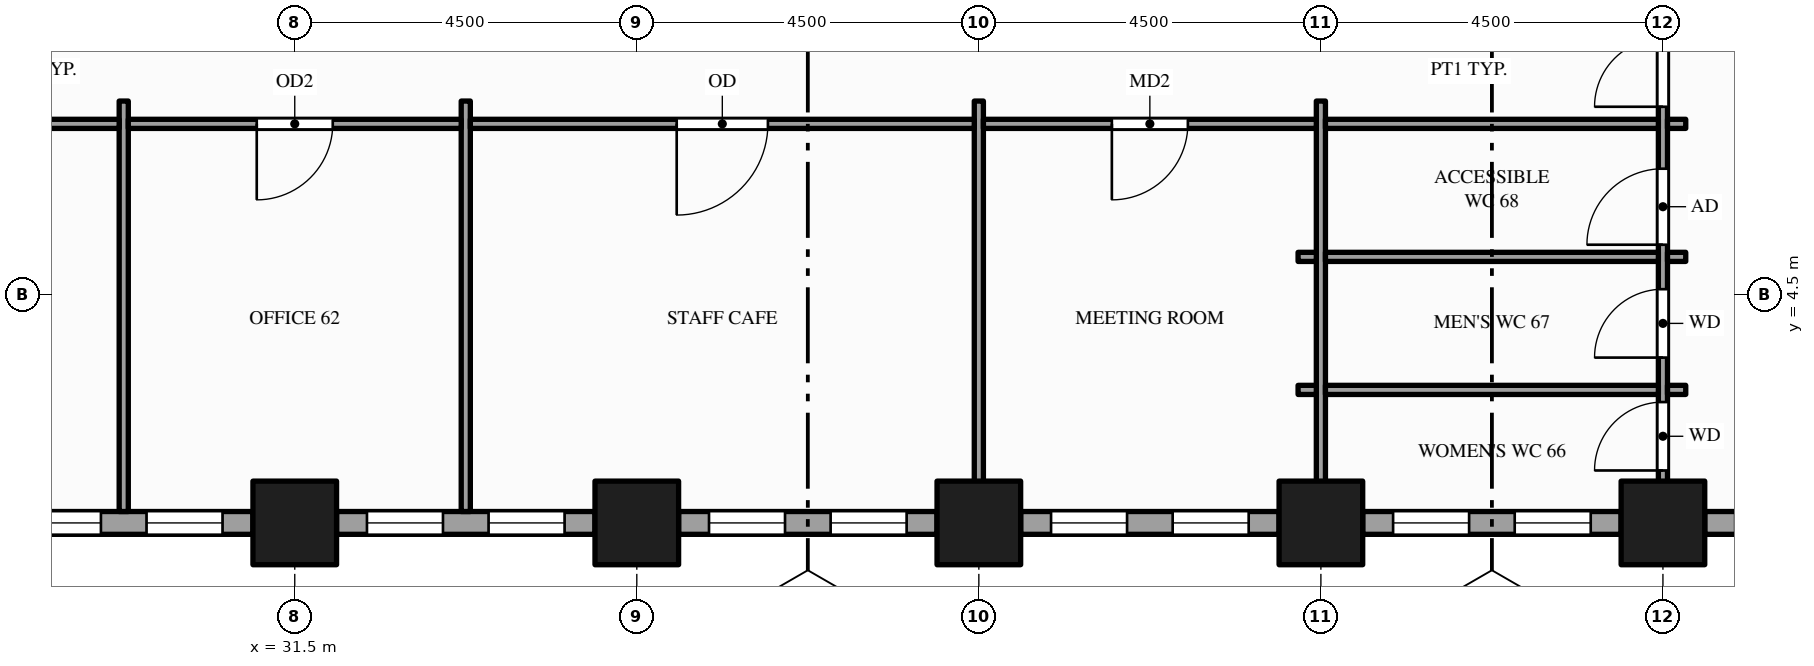
"""IFC4 building model, lengths in metres.
Left out: names, types, materials, properties, quantities, classifications, styles, units other than length and angle.
Written with IfcOpenShell. Run it as: python <this file> out.ifc"""

import sys

from ifc_helpers import new_model, si_unit, direction, frame, frame_2d, origin, origin_2d, place, context, subcontext, project, spatial, rectangle, hollow_rectangle, extrude, element, fill, save


model = new_model("IFC4")
c1 = context("Model", 3, precision=1e-05, world=origin(), true_north=direction((0.0, 1.0)))
c2 = subcontext(c1, "Body", "Model", "MODEL_VIEW")
j1 = project(units=[si_unit("LENGTHUNIT", "METRE"), si_unit("PLANEANGLEUNIT", "RADIAN")], contexts=[c1])
p1 = place(None, origin())
s1 = spatial("IfcSite", under=j1, at=p1, CompositionType="ELEMENT")
p2 = place(p1, origin())
s2 = spatial("IfcBuilding", under=s1, at=p2, CompositionType="ELEMENT")
p3 = place(p2, frame((0.0, 0.0, 49.0)))
s3 = spatial("IfcBuildingStorey", under=s2, at=p3, CompositionType="ELEMENT", Elevation=49.0)
for number, where, z_axis, x_axis in (
    (1, (31.5, 1.5, -0.15), (0.0, 0.0, 1.0), (1.0, 0.0, 0.0)),
    (2, (36.0, 1.5, -0.15), (0.0, 0.0, 1.0), (1.0, 0.0, 0.0)),
    (3, (40.5, 1.5, -0.15), (0.0, 0.0, 1.0), (1.0, 0.0, 0.0)),
    (4, (45.0, 1.5, -0.15), (0.0, 0.0, 1.0), (1.0, 0.0, 0.0)),
    (5, (49.5, 1.5, -0.15), (0.0, 0.0, 1.0), (1.0, 0.0, 0.0)),
):
    element("IfcColumn", number, at=place(p3, frame(where, z_axis=z_axis, x_axis=x_axis)), inside=s3, PredefinedType="COLUMN", context=c2, shape_type="SweptSolid", body=[
        extrude(hollow_rectangle(XDim=1.1, YDim=1.1, WallThickness=0.06, at=origin_2d()), origin(), (0.0, 0.0, 1.0), 4.0),
    ])
p4 = place(p3, frame((27.55, 1.5, 0.0), z_axis=(0.0, 0.0, 1.0), x_axis=(1.0, 0.0, 0.0)))
e6 = element("IfcWall", 6, at=p4, inside=s3, PredefinedType="STANDARD", context=c2, shape_type="SweptSolid", body=[
    extrude(rectangle(XDim=3.4, YDim=0.3, at=frame_2d((1.7, 0.0))), origin(), (0.0, 0.0, 1.0), 3.144),
])
p5 = place(p4, frame((0.4, 0.0, 0.9)))
e7 = element("IfcOpeningElement", 7, at=p5, cuts=e6, PredefinedType="OPENING", context=c2, shape_type="SweptSolid", body=[
    extrude(rectangle(XDim=1.0, YDim=2.0, at=frame_2d((0.5, 1.0))), frame((0.0, 0.16, 0.0), z_axis=(0.0, -1.0, 0.0), x_axis=(1.0, 0.0, 0.0)), (0.0, 0.0, 1.0), 0.32),
])
p6 = place(p4, frame((2.0, 0.0, 0.9)))
e8 = element("IfcOpeningElement", 8, at=p6, cuts=e6, PredefinedType="OPENING", context=c2, shape_type="SweptSolid", body=[
    extrude(rectangle(XDim=1.0, YDim=2.0, at=frame_2d((0.5, 1.0))), frame((0.0, 0.16, 0.0), z_axis=(0.0, -1.0, 0.0), x_axis=(1.0, 0.0, 0.0)), (0.0, 0.0, 1.0), 0.32),
])
p7 = place(p3, frame((32.05, 1.5, 0.0), z_axis=(0.0, 0.0, 1.0), x_axis=(1.0, 0.0, 0.0)))
e9 = element("IfcWall", 9, at=p7, inside=s3, PredefinedType="STANDARD", context=c2, shape_type="SweptSolid", body=[
    extrude(rectangle(XDim=3.4, YDim=0.3, at=frame_2d((1.7, 0.0))), origin(), (0.0, 0.0, 1.0), 3.144),
])
p8 = place(p7, frame((0.4, 0.0, 0.9)))
e10 = element("IfcOpeningElement", 10, at=p8, cuts=e9, PredefinedType="OPENING", context=c2, shape_type="SweptSolid", body=[
    extrude(rectangle(XDim=1.0, YDim=2.0, at=frame_2d((0.5, 1.0))), frame((0.0, 0.16, 0.0), z_axis=(0.0, -1.0, 0.0), x_axis=(1.0, 0.0, 0.0)), (0.0, 0.0, 1.0), 0.32),
])
p9 = place(p7, frame((2.0, 0.0, 0.9)))
e11 = element("IfcOpeningElement", 11, at=p9, cuts=e9, PredefinedType="OPENING", context=c2, shape_type="SweptSolid", body=[
    extrude(rectangle(XDim=1.0, YDim=2.0, at=frame_2d((0.5, 1.0))), frame((0.0, 0.16, 0.0), z_axis=(0.0, -1.0, 0.0), x_axis=(1.0, 0.0, 0.0)), (0.0, 0.0, 1.0), 0.32),
])
p10 = place(p3, frame((36.55, 1.5, 0.0), z_axis=(0.0, 0.0, 1.0), x_axis=(1.0, 0.0, 0.0)))
e12 = element("IfcWall", 12, at=p10, inside=s3, PredefinedType="STANDARD", context=c2, shape_type="SweptSolid", body=[
    extrude(rectangle(XDim=3.4, YDim=0.3, at=frame_2d((1.7, 0.0))), origin(), (0.0, 0.0, 1.0), 3.144),
])
p11 = place(p10, frame((0.4, 0.0, 0.9)))
e13 = element("IfcOpeningElement", 13, at=p11, cuts=e12, PredefinedType="OPENING", context=c2, shape_type="SweptSolid", body=[
    extrude(rectangle(XDim=1.0, YDim=2.0, at=frame_2d((0.5, 1.0))), frame((0.0, 0.16, 0.0), z_axis=(0.0, -1.0, 0.0), x_axis=(1.0, 0.0, 0.0)), (0.0, 0.0, 1.0), 0.32),
])
p12 = place(p10, frame((2.0, 0.0, 0.9)))
e14 = element("IfcOpeningElement", 14, at=p12, cuts=e12, PredefinedType="OPENING", context=c2, shape_type="SweptSolid", body=[
    extrude(rectangle(XDim=1.0, YDim=2.0, at=frame_2d((0.5, 1.0))), frame((0.0, 0.16, 0.0), z_axis=(0.0, -1.0, 0.0), x_axis=(1.0, 0.0, 0.0)), (0.0, 0.0, 1.0), 0.32),
])
p13 = place(p3, frame((41.05, 1.5, 0.0), z_axis=(0.0, 0.0, 1.0), x_axis=(1.0, 0.0, 0.0)))
e15 = element("IfcWall", 15, at=p13, inside=s3, PredefinedType="STANDARD", context=c2, shape_type="SweptSolid", body=[
    extrude(rectangle(XDim=3.4, YDim=0.3, at=frame_2d((1.7, 0.0))), origin(), (0.0, 0.0, 1.0), 3.144),
])
p14 = place(p13, frame((0.4, 0.0, 0.9)))
e16 = element("IfcOpeningElement", 16, at=p14, cuts=e15, PredefinedType="OPENING", context=c2, shape_type="SweptSolid", body=[
    extrude(rectangle(XDim=1.0, YDim=2.0, at=frame_2d((0.5, 1.0))), frame((0.0, 0.16, 0.0), z_axis=(0.0, -1.0, 0.0), x_axis=(1.0, 0.0, 0.0)), (0.0, 0.0, 1.0), 0.32),
])
p15 = place(p13, frame((2.0, 0.0, 0.9)))
e17 = element("IfcOpeningElement", 17, at=p15, cuts=e15, PredefinedType="OPENING", context=c2, shape_type="SweptSolid", body=[
    extrude(rectangle(XDim=1.0, YDim=2.0, at=frame_2d((0.5, 1.0))), frame((0.0, 0.16, 0.0), z_axis=(0.0, -1.0, 0.0), x_axis=(1.0, 0.0, 0.0)), (0.0, 0.0, 1.0), 0.32),
])
p16 = place(p3, frame((45.55, 1.5, 0.0), z_axis=(0.0, 0.0, 1.0), x_axis=(1.0, 0.0, 0.0)))
e18 = element("IfcWall", 18, at=p16, inside=s3, PredefinedType="STANDARD", context=c2, shape_type="SweptSolid", body=[
    extrude(rectangle(XDim=3.4, YDim=0.3, at=frame_2d((1.7, 0.0))), origin(), (0.0, 0.0, 1.0), 3.144),
])
p17 = place(p16, frame((0.4, 0.0, 0.9)))
e19 = element("IfcOpeningElement", 19, at=p17, cuts=e18, PredefinedType="OPENING", context=c2, shape_type="SweptSolid", body=[
    extrude(rectangle(XDim=1.0, YDim=2.0, at=frame_2d((0.5, 1.0))), frame((0.0, 0.16, 0.0), z_axis=(0.0, -1.0, 0.0), x_axis=(1.0, 0.0, 0.0)), (0.0, 0.0, 1.0), 0.32),
])
p18 = place(p16, frame((2.0, 0.0, 0.9)))
e20 = element("IfcOpeningElement", 20, at=p18, cuts=e18, PredefinedType="OPENING", context=c2, shape_type="SweptSolid", body=[
    extrude(rectangle(XDim=1.0, YDim=2.0, at=frame_2d((0.5, 1.0))), frame((0.0, 0.16, 0.0), z_axis=(0.0, -1.0, 0.0), x_axis=(1.0, 0.0, 0.0)), (0.0, 0.0, 1.0), 0.32),
])
p19 = place(p3, frame((50.05, 1.5, 0.0), z_axis=(0.0, 0.0, 1.0), x_axis=(1.0, 0.0, 0.0)))
e21 = element("IfcWall", 21, at=p19, inside=s3, PredefinedType="STANDARD", context=c2, shape_type="SweptSolid", body=[
    extrude(rectangle(XDim=3.95, YDim=0.3, at=frame_2d((1.975, 0.0))), origin(), (0.0, 0.0, 1.0), 3.144),
])
p20 = place(p19, frame((0.4, 0.0, 0.9)))
e22 = element("IfcOpeningElement", 22, at=p20, cuts=e21, PredefinedType="OPENING", context=c2, shape_type="SweptSolid", body=[
    extrude(rectangle(XDim=1.0, YDim=2.0, at=frame_2d((0.5, 1.0))), frame((0.0, 0.16, 0.0), z_axis=(0.0, -1.0, 0.0), x_axis=(1.0, 0.0, 0.0)), (0.0, 0.0, 1.0), 0.32),
])
p21 = place(p19, frame((2.0, 0.0, 0.9)))
e23 = element("IfcOpeningElement", 23, at=p21, cuts=e21, PredefinedType="OPENING", context=c2, shape_type="SweptSolid", body=[
    extrude(rectangle(XDim=1.55, YDim=2.0, at=frame_2d((0.775, 1.0))), frame((0.0, 0.16, 0.0), z_axis=(0.0, -1.0, 0.0), x_axis=(1.0, 0.0, 0.0)), (0.0, 0.0, 1.0), 0.32),
])
for number, where, z_axis, x_axis in (
    (24, (29.25, 1.65, 0.0), (0.0, 0.0, 1.0), (0.0, 1.0, 0.0)),
    (25, (33.75, 1.65, 0.0), (0.0, 0.0, 1.0), (0.0, 1.0, 0.0)),
    (26, (40.5, 1.65, 0.0), (0.0, 0.0, 1.0), (0.0, 1.0, 0.0)),
    (27, (45.0, 1.65, 0.0), (0.0, 0.0, 1.0), (0.0, 1.0, 0.0)),
):
    element("IfcWall", number, at=place(p3, frame(where, z_axis=z_axis, x_axis=x_axis)), inside=s3, PredefinedType="PARTITIONING", context=c2, shape_type="SweptSolid", body=[
        extrude(rectangle(XDim=5.4, YDim=0.12, at=frame_2d((2.7, 0.0))), origin(), (0.0, 0.0, 1.0), 2.938),
    ])
p22 = place(p3, frame((49.5, 1.65, 0.0), z_axis=(0.0, 0.0, 1.0), x_axis=(0.0, 1.0, 0.0)))
e28 = element("IfcWall", 28, at=p22, inside=s3, PredefinedType="PARTITIONING", context=c2, shape_type="SweptSolid", body=[
    extrude(rectangle(XDim=22.2, YDim=0.12, at=frame_2d((11.1, 0.0))), origin(), (0.0, 0.0, 1.0), 2.938),
])
p23 = place(p22, frame((5.325, 0.0, 0.0)))
e29 = element("IfcOpeningElement", 29, at=p23, cuts=e28, PredefinedType="OPENING", context=c2, shape_type="SweptSolid", body=[
    extrude(rectangle(XDim=1.8, YDim=2.1, at=frame_2d((0.9, 1.05))), frame((0.0, 0.07, 0.0), z_axis=(0.0, -1.0, 0.0), x_axis=(1.0, 0.0, 0.0)), (0.0, 0.0, 1.0), 0.14),
])
p24 = place(p22, frame((0.54, 0.0, 0.0)))
e30 = element("IfcOpeningElement", 30, at=p24, cuts=e28, PredefinedType="OPENING", context=c2, shape_type="SweptSolid", body=[
    extrude(rectangle(XDim=0.9, YDim=2.1, at=frame_2d((0.45, 1.05))), frame((0.0, 0.07, 0.0), z_axis=(0.0, -1.0, 0.0), x_axis=(1.0, 0.0, 0.0)), (0.0, 0.0, 1.0), 0.14),
])
p25 = place(p22, frame((2.025, 0.0, 0.0)))
e31 = element("IfcOpeningElement", 31, at=p25, cuts=e28, PredefinedType="OPENING", context=c2, shape_type="SweptSolid", body=[
    extrude(rectangle(XDim=0.9, YDim=2.1, at=frame_2d((0.45, 1.05))), frame((0.0, 0.07, 0.0), z_axis=(0.0, -1.0, 0.0), x_axis=(1.0, 0.0, 0.0)), (0.0, 0.0, 1.0), 0.14),
])
p26 = place(p22, frame((3.51, 0.0, 0.0)))
e32 = element("IfcOpeningElement", 32, at=p26, cuts=e28, PredefinedType="OPENING", context=c2, shape_type="SweptSolid", body=[
    extrude(rectangle(XDim=1.0, YDim=2.1, at=frame_2d((0.5, 1.05))), frame((0.0, 0.07, 0.0), z_axis=(0.0, -1.0, 0.0), x_axis=(1.0, 0.0, 0.0)), (0.0, 0.0, 1.0), 0.14),
])
p27 = place(p3, frame((44.7, 3.25, 0.0), z_axis=(0.0, 0.0, 1.0), x_axis=(1.0, 0.0, 0.0)))
e33 = element("IfcWall", 33, at=p27, inside=s3, PredefinedType="PARTITIONING", context=c2, shape_type="SweptSolid", body=[
    extrude(rectangle(XDim=0.24, YDim=0.12, at=frame_2d((0.12, 0.0))), origin(), (0.0, 0.0, 1.0), 2.938),
])
p28 = place(p3, frame((45.06, 3.25, 0.0), z_axis=(0.0, 0.0, 1.0), x_axis=(1.0, 0.0, 0.0)))
e34 = element("IfcWall", 34, at=p28, inside=s3, PredefinedType="PARTITIONING", context=c2, shape_type="SweptSolid", body=[
    extrude(rectangle(XDim=4.38, YDim=0.12, at=frame_2d((2.19, 0.0))), origin(), (0.0, 0.0, 1.0), 2.938),
])
for number, where, z_axis, x_axis in (
    (35, (49.56, 3.25, 0.0), (0.0, 0.0, 1.0), (1.0, 0.0, 0.0)),
    (36, (44.7, 5.0, 0.0), (0.0, 0.0, 1.0), (1.0, 0.0, 0.0)),
):
    element("IfcWall", number, at=place(p3, frame(where, z_axis=z_axis, x_axis=x_axis)), inside=s3, PredefinedType="PARTITIONING", context=c2, shape_type="SweptSolid", body=[
        extrude(rectangle(XDim=0.24, YDim=0.12, at=frame_2d((0.12, 0.0))), origin(), (0.0, 0.0, 1.0), 2.938),
    ])
p29 = place(p3, frame((45.06, 5.0, 0.0), z_axis=(0.0, 0.0, 1.0), x_axis=(1.0, 0.0, 0.0)))
e37 = element("IfcWall", 37, at=p29, inside=s3, PredefinedType="PARTITIONING", context=c2, shape_type="SweptSolid", body=[
    extrude(rectangle(XDim=4.38, YDim=0.12, at=frame_2d((2.19, 0.0))), origin(), (0.0, 0.0, 1.0), 2.938),
])
p30 = place(p3, frame((49.56, 5.0, 0.0), z_axis=(0.0, 0.0, 1.0), x_axis=(1.0, 0.0, 0.0)))
e38 = element("IfcWall", 38, at=p30, inside=s3, PredefinedType="PARTITIONING", context=c2, shape_type="SweptSolid", body=[
    extrude(rectangle(XDim=0.24, YDim=0.12, at=frame_2d((0.12, 0.0))), origin(), (0.0, 0.0, 1.0), 2.938),
])
p31 = place(p3, frame((22.56, 6.75, 0.0), z_axis=(0.0, 0.0, 1.0), x_axis=(1.0, 0.0, 0.0)))
e39 = element("IfcWall", 39, at=p31, inside=s3, PredefinedType="PARTITIONING", context=c2, shape_type="SweptSolid", body=[
    extrude(rectangle(XDim=6.63, YDim=0.12, at=frame_2d((3.315, 0.0))), origin(), (0.0, 0.0, 1.0), 2.938),
])
p32 = place(p31, frame((2.865, 0.0, 0.0)))
e40 = element("IfcOpeningElement", 40, at=p32, cuts=e39, PredefinedType="OPENING", context=c2, shape_type="SweptSolid", body=[
    extrude(rectangle(XDim=0.9, YDim=2.1, at=frame_2d((0.45, 1.05))), frame((0.0, 0.07, 0.0), z_axis=(0.0, -1.0, 0.0), x_axis=(1.0, 0.0, 0.0)), (0.0, 0.0, 1.0), 0.14),
])
p33 = place(p3, frame((29.31, 6.75, 0.0), z_axis=(0.0, 0.0, 1.0), x_axis=(1.0, 0.0, 0.0)))
e41 = element("IfcWall", 41, at=p33, inside=s3, PredefinedType="PARTITIONING", context=c2, shape_type="SweptSolid", body=[
    extrude(rectangle(XDim=4.38, YDim=0.12, at=frame_2d((2.19, 0.0))), origin(), (0.0, 0.0, 1.0), 2.938),
])
p34 = place(p33, frame((1.69, 0.0, 0.0)))
e42 = element("IfcOpeningElement", 42, at=p34, cuts=e41, PredefinedType="OPENING", context=c2, shape_type="SweptSolid", body=[
    extrude(rectangle(XDim=1.0, YDim=2.1, at=frame_2d((0.5, 1.05))), frame((0.0, 0.07, 0.0), z_axis=(0.0, -1.0, 0.0), x_axis=(1.0, 0.0, 0.0)), (0.0, 0.0, 1.0), 0.14),
])
p35 = place(p3, frame((33.81, 6.75, 0.0), z_axis=(0.0, 0.0, 1.0), x_axis=(1.0, 0.0, 0.0)))
e43 = element("IfcWall", 43, at=p35, inside=s3, PredefinedType="PARTITIONING", context=c2, shape_type="SweptSolid", body=[
    extrude(rectangle(XDim=6.63, YDim=0.12, at=frame_2d((3.315, 0.0))), origin(), (0.0, 0.0, 1.0), 2.938),
])
p36 = place(p35, frame((2.715, 0.0, 0.0)))
e44 = element("IfcOpeningElement", 44, at=p36, cuts=e43, PredefinedType="OPENING", context=c2, shape_type="SweptSolid", body=[
    extrude(rectangle(XDim=1.2, YDim=2.1, at=frame_2d((0.6, 1.05))), frame((0.0, 0.07, 0.0), z_axis=(0.0, -1.0, 0.0), x_axis=(1.0, 0.0, 0.0)), (0.0, 0.0, 1.0), 0.14),
])
p37 = place(p3, frame((40.56, 6.75, 0.0), z_axis=(0.0, 0.0, 1.0), x_axis=(1.0, 0.0, 0.0)))
e45 = element("IfcWall", 45, at=p37, inside=s3, PredefinedType="PARTITIONING", context=c2, shape_type="SweptSolid", body=[
    extrude(rectangle(XDim=4.38, YDim=0.12, at=frame_2d((2.19, 0.0))), origin(), (0.0, 0.0, 1.0), 2.938),
])
p38 = place(p37, frame((1.69, 0.0, 0.0)))
e46 = element("IfcOpeningElement", 46, at=p38, cuts=e45, PredefinedType="OPENING", context=c2, shape_type="SweptSolid", body=[
    extrude(rectangle(XDim=1.0, YDim=2.1, at=frame_2d((0.5, 1.05))), frame((0.0, 0.07, 0.0), z_axis=(0.0, -1.0, 0.0), x_axis=(1.0, 0.0, 0.0)), (0.0, 0.0, 1.0), 0.14),
])
p39 = place(p3, frame((45.06, 6.75, 0.0), z_axis=(0.0, 0.0, 1.0), x_axis=(1.0, 0.0, 0.0)))
e47 = element("IfcWall", 47, at=p39, inside=s3, PredefinedType="PARTITIONING", context=c2, shape_type="SweptSolid", body=[
    extrude(rectangle(XDim=4.38, YDim=0.12, at=frame_2d((2.19, 0.0))), origin(), (0.0, 0.0, 1.0), 2.938),
])
p40 = place(p3, frame((49.56, 6.75, 0.0), z_axis=(0.0, 0.0, 1.0), x_axis=(1.0, 0.0, 0.0)))
e48 = element("IfcWall", 48, at=p40, inside=s3, PredefinedType="PARTITIONING", context=c2, shape_type="SweptSolid", body=[
    extrude(rectangle(XDim=0.24, YDim=0.12, at=frame_2d((0.12, 0.0))), origin(), (0.0, 0.0, 1.0), 2.938),
])
p41 = place(p5, origin())
e49 = element("IfcWindow", 49, at=p41, inside=s3, PartitioningType="SINGLE_PANEL", PredefinedType="WINDOW", context=c2, shape_type="SweptSolid", body=[
    extrude(rectangle(XDim=1.0, YDim=2.0, at=frame_2d((0.5, 1.0))), frame((0.0, 0.03, 0.0), z_axis=(0.0, -1.0, 0.0), x_axis=(1.0, 0.0, 0.0)), (0.0, 0.0, 1.0), 0.06),
])
fill(e7, e49)
p42 = place(p6, origin())
e50 = element("IfcWindow", 50, at=p42, inside=s3, PartitioningType="SINGLE_PANEL", PredefinedType="WINDOW", context=c2, shape_type="SweptSolid", body=[
    extrude(rectangle(XDim=1.0, YDim=2.0, at=frame_2d((0.5, 1.0))), frame((0.0, 0.03, 0.0), z_axis=(0.0, -1.0, 0.0), x_axis=(1.0, 0.0, 0.0)), (0.0, 0.0, 1.0), 0.06),
])
fill(e8, e50)
p43 = place(p8, origin())
e51 = element("IfcWindow", 51, at=p43, inside=s3, PartitioningType="SINGLE_PANEL", PredefinedType="WINDOW", context=c2, shape_type="SweptSolid", body=[
    extrude(rectangle(XDim=1.0, YDim=2.0, at=frame_2d((0.5, 1.0))), frame((0.0, 0.03, 0.0), z_axis=(0.0, -1.0, 0.0), x_axis=(1.0, 0.0, 0.0)), (0.0, 0.0, 1.0), 0.06),
])
fill(e10, e51)
p44 = place(p9, origin())
e52 = element("IfcWindow", 52, at=p44, inside=s3, PartitioningType="SINGLE_PANEL", PredefinedType="WINDOW", context=c2, shape_type="SweptSolid", body=[
    extrude(rectangle(XDim=1.0, YDim=2.0, at=frame_2d((0.5, 1.0))), frame((0.0, 0.03, 0.0), z_axis=(0.0, -1.0, 0.0), x_axis=(1.0, 0.0, 0.0)), (0.0, 0.0, 1.0), 0.06),
])
fill(e11, e52)
p45 = place(p11, origin())
e53 = element("IfcWindow", 53, at=p45, inside=s3, PartitioningType="SINGLE_PANEL", PredefinedType="WINDOW", context=c2, shape_type="SweptSolid", body=[
    extrude(rectangle(XDim=1.0, YDim=2.0, at=frame_2d((0.5, 1.0))), frame((0.0, 0.03, 0.0), z_axis=(0.0, -1.0, 0.0), x_axis=(1.0, 0.0, 0.0)), (0.0, 0.0, 1.0), 0.06),
])
fill(e13, e53)
p46 = place(p12, origin())
e54 = element("IfcWindow", 54, at=p46, inside=s3, PartitioningType="SINGLE_PANEL", PredefinedType="WINDOW", context=c2, shape_type="SweptSolid", body=[
    extrude(rectangle(XDim=1.0, YDim=2.0, at=frame_2d((0.5, 1.0))), frame((0.0, 0.03, 0.0), z_axis=(0.0, -1.0, 0.0), x_axis=(1.0, 0.0, 0.0)), (0.0, 0.0, 1.0), 0.06),
])
fill(e14, e54)
p47 = place(p14, origin())
e55 = element("IfcWindow", 55, at=p47, inside=s3, PartitioningType="SINGLE_PANEL", PredefinedType="WINDOW", context=c2, shape_type="SweptSolid", body=[
    extrude(rectangle(XDim=1.0, YDim=2.0, at=frame_2d((0.5, 1.0))), frame((0.0, 0.03, 0.0), z_axis=(0.0, -1.0, 0.0), x_axis=(1.0, 0.0, 0.0)), (0.0, 0.0, 1.0), 0.06),
])
fill(e16, e55)
p48 = place(p15, origin())
e56 = element("IfcWindow", 56, at=p48, inside=s3, PartitioningType="SINGLE_PANEL", PredefinedType="WINDOW", context=c2, shape_type="SweptSolid", body=[
    extrude(rectangle(XDim=1.0, YDim=2.0, at=frame_2d((0.5, 1.0))), frame((0.0, 0.03, 0.0), z_axis=(0.0, -1.0, 0.0), x_axis=(1.0, 0.0, 0.0)), (0.0, 0.0, 1.0), 0.06),
])
fill(e17, e56)
p49 = place(p17, origin())
e57 = element("IfcWindow", 57, at=p49, inside=s3, PartitioningType="SINGLE_PANEL", PredefinedType="WINDOW", context=c2, shape_type="SweptSolid", body=[
    extrude(rectangle(XDim=1.0, YDim=2.0, at=frame_2d((0.5, 1.0))), frame((0.0, 0.03, 0.0), z_axis=(0.0, -1.0, 0.0), x_axis=(1.0, 0.0, 0.0)), (0.0, 0.0, 1.0), 0.06),
])
fill(e19, e57)
p50 = place(p18, origin())
e58 = element("IfcWindow", 58, at=p50, inside=s3, PartitioningType="SINGLE_PANEL", PredefinedType="WINDOW", context=c2, shape_type="SweptSolid", body=[
    extrude(rectangle(XDim=1.0, YDim=2.0, at=frame_2d((0.5, 1.0))), frame((0.0, 0.03, 0.0), z_axis=(0.0, -1.0, 0.0), x_axis=(1.0, 0.0, 0.0)), (0.0, 0.0, 1.0), 0.06),
])
fill(e20, e58)
p51 = place(p23, origin())
e59 = element("IfcDoor", 59, at=p51, inside=s3, OperationType="DOUBLE_DOOR_SINGLE_SWING", PredefinedType="DOOR", context=c2, shape_type="SweptSolid", body=[
    extrude(rectangle(XDim=1.8, YDim=2.1, at=frame_2d((0.9, 1.05))), frame((0.0, 0.025, 0.0), z_axis=(0.0, -1.0, 0.0), x_axis=(1.0, 0.0, 0.0)), (0.0, 0.0, 1.0), 0.05),
])
fill(e29, e59)
p52 = place(p34, origin())
e60 = element("IfcDoor", 60, at=p52, inside=s3, OperationType="SINGLE_SWING_LEFT", PredefinedType="DOOR", context=c2, shape_type="SweptSolid", body=[
    extrude(rectangle(XDim=1.0, YDim=2.1, at=frame_2d((0.5, 1.05))), frame((0.0, 0.025, 0.0), z_axis=(0.0, -1.0, 0.0), x_axis=(1.0, 0.0, 0.0)), (0.0, 0.0, 1.0), 0.05),
])
fill(e42, e60)
p53 = place(p36, origin())
e61 = element("IfcDoor", 61, at=p53, inside=s3, OperationType="SINGLE_SWING_LEFT", PredefinedType="DOOR", context=c2, shape_type="SweptSolid", body=[
    extrude(rectangle(XDim=1.2, YDim=2.1, at=frame_2d((0.6, 1.05))), frame((0.0, 0.025, 0.0), z_axis=(0.0, -1.0, 0.0), x_axis=(1.0, 0.0, 0.0)), (0.0, 0.0, 1.0), 0.05),
])
fill(e44, e61)
p54 = place(p38, origin())
e62 = element("IfcDoor", 62, at=p54, inside=s3, OperationType="SINGLE_SWING_LEFT", PredefinedType="DOOR", context=c2, shape_type="SweptSolid", body=[
    extrude(rectangle(XDim=1.0, YDim=2.1, at=frame_2d((0.5, 1.05))), frame((0.0, 0.025, 0.0), z_axis=(0.0, -1.0, 0.0), x_axis=(1.0, 0.0, 0.0)), (0.0, 0.0, 1.0), 0.05),
])
fill(e46, e62)
p55 = place(p24, origin())
e63 = element("IfcDoor", 63, at=p55, inside=s3, OperationType="SINGLE_SWING_LEFT", PredefinedType="DOOR", context=c2, shape_type="SweptSolid", body=[
    extrude(rectangle(XDim=0.9, YDim=2.1, at=frame_2d((0.45, 1.05))), frame((0.0, 0.025, 0.0), z_axis=(0.0, -1.0, 0.0), x_axis=(1.0, 0.0, 0.0)), (0.0, 0.0, 1.0), 0.05),
])
fill(e30, e63)
p56 = place(p25, origin())
e64 = element("IfcDoor", 64, at=p56, inside=s3, OperationType="SINGLE_SWING_LEFT", PredefinedType="DOOR", context=c2, shape_type="SweptSolid", body=[
    extrude(rectangle(XDim=0.9, YDim=2.1, at=frame_2d((0.45, 1.05))), frame((0.0, 0.025, 0.0), z_axis=(0.0, -1.0, 0.0), x_axis=(1.0, 0.0, 0.0)), (0.0, 0.0, 1.0), 0.05),
])
fill(e31, e64)
p57 = place(p26, origin())
e65 = element("IfcDoor", 65, at=p57, inside=s3, OperationType="SINGLE_SWING_LEFT", PredefinedType="DOOR", context=c2, shape_type="SweptSolid", body=[
    extrude(rectangle(XDim=1.0, YDim=2.1, at=frame_2d((0.5, 1.05))), frame((0.0, 0.025, 0.0), z_axis=(0.0, -1.0, 0.0), x_axis=(1.0, 0.0, 0.0)), (0.0, 0.0, 1.0), 0.05),
])
fill(e32, e65)
save(model, sys.argv[1])
